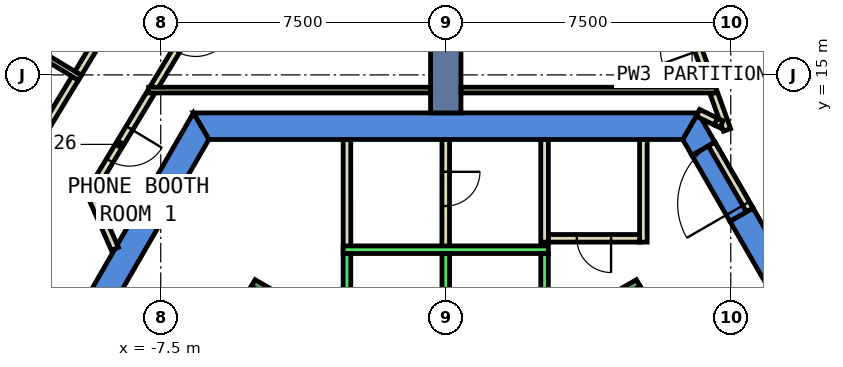
"""IFC4 building model, lengths in metres.
Left out: names, types, materials, properties, quantities, classifications, styles, units other than length and angle.
Written with IfcOpenShell. Run it as: python <this file> out.ifc"""

import sys

from ifc_helpers import new_model, si_unit, direction, frame, frame_2d, origin, place, context, subcontext, project, spatial, polyline, rectangle, outline, extrude, element, fill, save


model = new_model("IFC4")
c1 = context("Model", 3, precision=1e-05, world=origin(), true_north=direction((0.0, 1.0)))
c2 = subcontext(c1, "Body", "Model", "MODEL_VIEW")
j1 = project(units=[si_unit("LENGTHUNIT", "METRE"), si_unit("PLANEANGLEUNIT", "RADIAN")], contexts=[c1])
p1 = place(None, origin())
s1 = spatial("IfcSite", under=j1, at=p1, CompositionType="ELEMENT")
p2 = place(p1, origin())
s2 = spatial("IfcBuilding", under=s1, at=p2, CompositionType="ELEMENT")
p3 = place(p2, frame((0.0, 0.0, 189.8)))
s3 = spatial("IfcBuildingStorey", under=s2, at=p3, CompositionType="ELEMENT", Elevation=189.8)
p4 = place(p3, frame((0.0, 0.0, -0.6)))
e1 = element("IfcWall", 1, at=p4, inside=s3, PredefinedType="SHEAR", context=c2, shape_type="SweptSolid", body=[
    extrude(outline(polyline([(8.084, 11.498), (7.478, 11.148), (12.471, 2.5), (13.279, 2.5), (8.084, 11.498)])), origin(), (0.0, 0.0, 1.0), 4.4),
])
p5 = place(p3, frame((0.0, 0.0, -0.6)))
e2 = element("IfcWall", 2, at=p5, inside=s3, PredefinedType="SHEAR", context=c2, shape_type="SweptSolid", body=[
    extrude(outline(polyline([(6.478, 12.88), (7.084, 13.23), (6.64, 14.0), (6.235, 13.3), (6.478, 12.88)])), origin(), (0.0, 0.0, 1.0), 4.4),
])
p6 = place(p3, frame((0.0, 0.0, 3.6)))
e3 = element("IfcWall", 3, at=p6, inside=s3, PredefinedType="SHEAR", context=c2, shape_type="SweptSolid", body=[
    extrude(outline(polyline([(7.084, 13.23), (6.478, 12.88), (7.478, 11.148), (8.084, 11.498), (7.084, 13.23)])), origin(), (0.0, 0.0, 1.0), 0.2),
])
p7 = place(p3, frame((0.0, 0.0, -0.6)))
e4 = element("IfcWall", 4, at=p7, inside=s3, PredefinedType="SHEAR", context=c2, shape_type="SweptSolid", body=[
    extrude(outline(polyline([(6.64, 14.0), (-6.64, 14.0), (-6.235, 13.3), (6.235, 13.3), (6.64, 14.0)])), origin(), (0.0, 0.0, 1.0), 4.4),
])
p8 = place(p3, frame((0.0, 0.0, -0.6)))
e5 = element("IfcWall", 5, at=p8, inside=s3, PredefinedType="SHEAR", context=c2, shape_type="SweptSolid", body=[
    extrude(outline(polyline([(-11.834, 5.002), (-11.228, 4.652), (-6.235, 13.3), (-6.64, 14.0), (-11.834, 5.002)])), origin(), (0.0, 0.0, 1.0), 4.4),
])
p9 = place(p3, frame((0.0, 14.0, -0.6), z_axis=(0.0, 0.0, 1.0), x_axis=(0.0, 1.0, 0.0)))
e6 = element("IfcWall", 6, at=p9, inside=s3, PredefinedType="SHEAR", context=c2, shape_type="SweptSolid", body=[
    extrude(rectangle(XDim=9.0, YDim=0.8, at=frame_2d((4.5, 0.0))), origin(), (0.0, 0.0, 1.0), 4.4),
])
p10 = place(p3, frame((6.64, 14.0, 0.0), z_axis=(0.0, 0.0, 1.0), x_axis=(0.899046412443, -0.437853341055, 0.0)))
e7 = element("IfcWall", 7, at=p10, inside=s3, PredefinedType="PARTITIONING", context=c2, shape_type="SweptSolid", body=[
    extrude(rectangle(XDim=0.523, YDim=0.2, at=frame_2d((0.261, 0.0))), origin(), (0.0, 0.0, 1.0), 3.8),
])
p11 = place(p3, frame((7.401, 13.552, 0.0), z_axis=(0.0, 0.0, 1.0), x_axis=(-0.337944878606, 0.941165904091, 0.0)))
e8 = element("IfcWall", 8, at=p11, inside=s3, PredefinedType="PARTITIONING", context=c2, shape_type="SweptSolid", body=[
    extrude(rectangle(XDim=1.038, YDim=0.2, at=frame_2d((0.519, 0.0))), origin(), (0.0, 0.0, 1.0), 3.8),
])
p12 = place(p3, frame((-7.759, 14.536, 0.0), z_axis=(0.0, 0.0, 1.0), x_axis=(-0.516926279395, -0.856029918678, 0.0)))
e9 = element("IfcWall", 9, at=p12, inside=s3, PredefinedType="PARTITIONING", context=c2, shape_type="SweptSolid", body=[
    extrude(rectangle(XDim=3.188, YDim=0.2, at=frame_2d((1.594, 0.0))), origin(), (0.0, 0.0, 1.0), 3.8),
])
p13 = place(p12, frame((1.094, 0.0, 0.0)))
e10 = element("IfcOpeningElement", 10, at=p13, cuts=e9, PredefinedType="OPENING", context=c2, shape_type="SweptSolid", body=[
    extrude(rectangle(XDim=1.0, YDim=2.1, at=frame_2d((0.5, 1.05))), frame((0.0, 0.11, 0.0), z_axis=(0.0, -1.0, 0.0), x_axis=(1.0, 0.0, 0.0)), (0.0, 0.0, 1.0), 0.22),
])
p14 = place(p3, frame((-9.315, 11.801, 0.0), z_axis=(0.0, 0.0, 1.0), x_axis=(0.403943240321, -0.914784050254, 0.0)))
e11 = element("IfcWall", 11, at=p14, inside=s3, PredefinedType="PARTITIONING", context=c2, shape_type="SweptSolid", body=[
    extrude(rectangle(XDim=1.507, YDim=0.2, at=frame_2d((0.754, 0.0))), origin(), (0.0, 0.0, 1.0), 3.8),
])
p15 = place(p3, frame((6.999, 14.671, 0.0), z_axis=(0.0, 0.0, 1.0), x_axis=(-0.338795881304, 0.940859899672, 0.0)))
e12 = element("IfcWall", 12, at=p15, inside=s3, PredefinedType="PARTITIONING", context=c2, shape_type="SweptSolid", body=[
    extrude(rectangle(XDim=3.055, YDim=0.2, at=frame_2d((1.527, 0.0))), origin(), (0.0, 0.0, 1.0), 3.8),
])
p16 = place(p15, frame((1.027, 0.0, 0.0)))
e13 = element("IfcOpeningElement", 13, at=p16, cuts=e12, PredefinedType="OPENING", context=c2, shape_type="SweptSolid", body=[
    extrude(rectangle(XDim=1.0, YDim=2.1, at=frame_2d((0.5, 1.05))), frame((0.0, 0.11, 0.0), z_axis=(0.0, -1.0, 0.0), x_axis=(1.0, 0.0, 0.0)), (0.0, 0.0, 1.0), 0.22),
])
p17 = place(p3, frame((-5.998, 17.451, 0.0), z_axis=(0.0, 0.0, 1.0), x_axis=(-0.516919907997, -0.856033766108, 0.0)))
e14 = element("IfcWall", 14, at=p17, inside=s3, PredefinedType="PARTITIONING", context=c2, shape_type="SweptSolid", body=[
    extrude(rectangle(XDim=3.256, YDim=0.2, at=frame_2d((1.628, 0.0))), origin(), (0.0, 0.0, 1.0), 3.8),
])
p18 = place(p17, frame((1.128, 0.0, 0.0)))
e15 = element("IfcOpeningElement", 15, at=p18, cuts=e14, PredefinedType="OPENING", context=c2, shape_type="SweptSolid", body=[
    extrude(rectangle(XDim=1.0, YDim=2.1, at=frame_2d((0.5, 1.05))), frame((0.0, 0.11, 0.0), z_axis=(0.0, -1.0, 0.0), x_axis=(1.0, 0.0, 0.0)), (0.0, 0.0, 1.0), 0.22),
])
p19 = place(p3, frame((7.615, 18.449, 0.0), z_axis=(0.0, 0.0, 1.0), x_axis=(0.516918251554, -0.856034766356, 0.0)))
e16 = element("IfcWall", 16, at=p19, inside=s3, PredefinedType="PARTITIONING", context=c2, shape_type="SweptSolid", body=[
    extrude(rectangle(XDim=3.983, YDim=0.2, at=frame_2d((1.992, 0.0))), origin(), (0.0, 0.0, 1.0), 3.8),
])
p20 = place(p19, frame((1.492, 0.0, 0.0)))
e17 = element("IfcOpeningElement", 17, at=p20, cuts=e16, PredefinedType="OPENING", context=c2, shape_type="SweptSolid", body=[
    extrude(rectangle(XDim=1.0, YDim=2.1, at=frame_2d((0.5, 1.05))), frame((0.0, 0.11, 0.0), z_axis=(0.0, -1.0, 0.0), x_axis=(1.0, 0.0, 0.0)), (0.0, 0.0, 1.0), 0.22),
])
p21 = place(p3, frame((-9.674, 15.039, 0.0), z_axis=(0.0, 0.0, 1.0), x_axis=(0.516918251554, 0.856034766356, 0.0)))
e18 = element("IfcWall", 18, at=p21, inside=s3, PredefinedType="PARTITIONING", context=c2, shape_type="SweptSolid", body=[
    extrude(rectangle(XDim=3.983, YDim=0.2, at=frame_2d((1.992, 0.0))), origin(), (0.0, 0.0, 1.0), 3.8),
])
p22 = place(p3, frame((-11.811, 11.503, 0.0), z_axis=(0.0, 0.0, 1.0), x_axis=(0.517135291957, 0.855903668535, 0.0)))
e19 = element("IfcWall", 19, at=p22, inside=s3, PredefinedType="PARTITIONING", context=c2, shape_type="SweptSolid", body=[
    extrude(rectangle(XDim=3.982, YDim=0.2, at=frame_2d((1.991, 0.0))), origin(), (0.0, 0.0, 1.0), 3.8),
])
p23 = place(p3, frame((5.2, 13.3, 0.0), z_axis=(0.0, 0.0, 1.0), x_axis=(0.0, -1.0, 0.0)))
e20 = element("IfcWall", 20, at=p23, inside=s3, PredefinedType="PARTITIONING", context=c2, shape_type="SweptSolid", body=[
    extrude(rectangle(XDim=2.7, YDim=0.2, at=frame_2d((1.35, 0.0))), origin(), (0.0, 0.0, 1.0), 3.8),
])
p24 = place(p3, frame((5.1, 10.7, 0.0), z_axis=(0.0, 0.0, 1.0), x_axis=(-1.0, 0.0, 0.0)))
e21 = element("IfcWall", 21, at=p24, inside=s3, PredefinedType="PARTITIONING", context=c2, shape_type="SweptSolid", body=[
    extrude(rectangle(XDim=2.4, YDim=0.2, at=frame_2d((1.2, 0.0))), origin(), (0.0, 0.0, 1.0), 3.8),
])
p25 = place(p24, frame((0.75, 0.0, 0.0)))
e22 = element("IfcOpeningElement", 22, at=p25, cuts=e21, PredefinedType="OPENING", context=c2, shape_type="SweptSolid", body=[
    extrude(rectangle(XDim=0.9, YDim=2.1, at=frame_2d((0.45, 1.05))), frame((0.0, 0.11, 0.0), z_axis=(0.0, -1.0, 0.0), x_axis=(1.0, 0.0, 0.0)), (0.0, 0.0, 1.0), 0.22),
])
p26 = place(p3, frame((2.6, 10.6, 0.0), z_axis=(0.0, 0.0, 1.0), x_axis=(0.0, 1.0, 0.0)))
e23 = element("IfcWall", 23, at=p26, inside=s3, PredefinedType="PARTITIONING", context=c2, shape_type="SweptSolid", body=[
    extrude(rectangle(XDim=2.7, YDim=0.2, at=frame_2d((1.35, 0.0))), origin(), (0.0, 0.0, 1.0), 3.8),
])
p27 = place(p3, frame((-2.599, 10.399, 0.0), z_axis=(0.0, 0.0, 1.0), x_axis=(-0.000336615314, 0.999999943345, 0.0)))
e24 = element("IfcWall", 24, at=p27, inside=s3, PredefinedType="PARTITIONING", context=c2, shape_type="SweptSolid", body=[
    extrude(rectangle(XDim=2.901, YDim=0.2, at=frame_2d((1.451, 0.0))), origin(), (0.0, 0.0, 1.0), 3.8),
])
p28 = place(p3, frame((0.0, 13.3, 0.0), z_axis=(0.0, 0.0, 1.0), x_axis=(-0.000336728662, -0.999999943307, 0.0)))
e25 = element("IfcWall", 25, at=p28, inside=s3, PredefinedType="PARTITIONING", context=c2, shape_type="SweptSolid", body=[
    extrude(rectangle(XDim=2.9, YDim=0.2, at=frame_2d((1.45, 0.0))), origin(), (0.0, 0.0, 1.0), 3.8),
])
p29 = place(p28, frame((0.85, 0.0, 0.0)))
e26 = element("IfcOpeningElement", 26, at=p29, cuts=e25, PredefinedType="OPENING", context=c2, shape_type="SweptSolid", body=[
    extrude(rectangle(XDim=0.9, YDim=2.1, at=frame_2d((0.45, 1.05))), frame((0.0, 0.11, 0.0), z_axis=(0.0, -1.0, 0.0), x_axis=(1.0, 0.0, 0.0)), (0.0, 0.0, 1.0), 0.22),
])
p30 = place(p3, frame((7.124, 14.6, 0.0), z_axis=(0.0, 0.0, 1.0), x_axis=(-1.0, 0.0, 0.0)))
e27 = element("IfcWall", 27, at=p30, inside=s3, PredefinedType="PARTITIONING", context=c2, shape_type="SweptSolid", body=[
    extrude(rectangle(XDim=6.724, YDim=0.15, at=frame_2d((3.362, 0.0))), origin(), (0.0, 0.0, 1.0), 3.8),
])
p31 = place(p3, frame((-0.4, 14.6, 0.0), z_axis=(0.0, 0.0, 1.0), x_axis=(-1.0, 0.0, 0.0)))
e28 = element("IfcWall", 28, at=p31, inside=s3, PredefinedType="PARTITIONING", context=c2, shape_type="SweptSolid", body=[
    extrude(rectangle(XDim=7.42, YDim=0.15, at=frame_2d((3.71, 0.0))), origin(), (0.0, 0.0, 1.0), 3.8),
])
p32 = place(p3, frame((-9.628, 14.924, 0.0), z_axis=(0.0, 0.0, 1.0), x_axis=(-0.855931736607, 0.517088834021, 0.0)))
e29 = element("IfcWall", 29, at=p32, inside=s3, PredefinedType="PARTITIONING", context=c2, shape_type="SweptSolid", body=[
    extrude(rectangle(XDim=5.699, YDim=0.15, at=frame_2d((2.85, 0.0))), origin(), (0.0, 0.0, 1.0), 3.8),
])
p33 = place(p3, frame((7.997, 11.448, 0.0), z_axis=(0.0, 0.0, 1.0), x_axis=(-0.50002537861, 0.866010750942, 0.0)))
e30 = element("IfcWall", 30, at=p33, inside=s3, PredefinedType="PARTITIONING", context=c2, shape_type="SweptSolid", body=[
    extrude(rectangle(XDim=2.0, YDim=0.2, at=frame_2d((1.0, 0.0))), origin(), (0.0, 0.0, 1.0), 2.4),
])
p34 = place(p33, frame((0.19, 0.0, 0.0)))
e31 = element("IfcOpeningElement", 31, at=p34, cuts=e30, PredefinedType="OPENING", context=c2, shape_type="SweptSolid", body=[
    extrude(rectangle(XDim=1.8, YDim=2.1, at=frame_2d((0.9, 1.05))), frame((0.0, 0.11, 0.0), z_axis=(0.0, -1.0, 0.0), x_axis=(1.0, 0.0, 0.0)), (0.0, 0.0, 1.0), 0.22),
])
p35 = place(p3, frame((7.11, 13.771, 0.0), z_axis=(0.0, 0.0, 1.0), x_axis=(0.900120852209, -0.435640277545, 0.0)))
e32 = element("IfcWall", 32, at=p35, inside=s3, PredefinedType="PARTITIONING", context=c2, shape_type="SweptSolid", body=[
    extrude(rectangle(XDim=0.161, YDim=0.2, at=frame_2d((0.081, 0.0))), origin(), (0.0, 0.0, 1.0), 2.4),
])
p36 = place(p3, frame((2.7, 10.4, 0.0), z_axis=(0.0, 0.0, 1.0), x_axis=(-1.0, 0.0, 0.0)))
e33 = element("IfcWall", 33, at=p36, inside=s3, PredefinedType="STANDARD", context=c2, shape_type="SweptSolid", body=[
    extrude(rectangle(XDim=5.4, YDim=0.2, at=frame_2d((2.7, 0.0))), origin(), (0.0, 0.0, 1.0), 3.8),
])
for number, where, z_axis, x_axis in (
    (34, (2.6, 7.9, 0.0), (0.0, 0.0, 1.0), (0.0, 1.0, 0.0)),
    (35, (0.0, 7.9, 0.0), (0.0, 0.0, 1.0), (0.0, 1.0, 0.0)),
    (36, (-2.6, 7.9, 0.0), (0.0, 0.0, 1.0), (0.0, 1.0, 0.0)),
):
    element("IfcWall", number, at=place(p3, frame(where, z_axis=z_axis, x_axis=x_axis)), inside=s3, PredefinedType="STANDARD", context=c2, shape_type="SweptSolid", body=[
        extrude(rectangle(XDim=2.4, YDim=0.2, at=frame_2d((1.2, 0.0))), origin(), (0.0, 0.0, 1.0), 3.8),
    ])
p37 = place(p3, frame((2.7, 8.158, 0.0), z_axis=(0.0, 0.0, 1.0), x_axis=(0.86611865017, 0.499838457731, 0.0)))
e37 = element("IfcWall", 37, at=p37, inside=s3, PredefinedType="STANDARD", context=c2, shape_type="SweptSolid", body=[
    extrude(rectangle(XDim=2.733, YDim=0.2, at=frame_2d((1.366, 0.0))), origin(), (0.0, 0.0, 1.0), 3.8),
])
p38 = place(p3, frame((8.48, 3.412, 0.0), z_axis=(0.0, 0.0, 1.0), x_axis=(-0.499978703459, 0.866037698999, 0.0)))
e38 = element("IfcWall", 38, at=p38, inside=s3, PredefinedType="STANDARD", context=c2, shape_type="SweptSolid", body=[
    extrude(rectangle(XDim=6.9, YDim=0.2, at=frame_2d((3.45, 0.0))), origin(), (0.0, 0.0, 1.0), 3.8),
])
p39 = place(p3, frame((-1.256, 7.324, 0.0), z_axis=(0.0, 0.0, 1.0), x_axis=(-0.866046073146, 0.499964197906, 0.0)))
e39 = element("IfcWall", 39, at=p39, inside=s3, PredefinedType="STANDARD", context=c2, shape_type="SweptSolid", body=[
    extrude(rectangle(XDim=4.4, YDim=0.2, at=frame_2d((2.2, 0.0))), origin(), (0.0, 0.0, 1.0), 3.8),
])
p40 = place(p39, frame((2.4, 0.0, 0.0)))
e40 = element("IfcOpeningElement", 40, at=p40, cuts=e39, PredefinedType="OPENING", context=c2, shape_type="SweptSolid", body=[
    extrude(rectangle(XDim=1.1, YDim=2.2, at=frame_2d((0.55, 1.1))), frame((0.0, 0.11, 0.0), z_axis=(0.0, -1.0, 0.0), x_axis=(1.0, 0.0, 0.0)), (0.0, 0.0, 1.0), 0.22),
])
p41 = place(p3, frame((-5.03, 9.388, 0.0), z_axis=(0.0, 0.0, 1.0), x_axis=(-0.499978703459, -0.866037698999, 0.0)))
e41 = element("IfcWall", 41, at=p41, inside=s3, PredefinedType="STANDARD", context=c2, shape_type="SweptSolid", body=[
    extrude(rectangle(XDim=6.9, YDim=0.2, at=frame_2d((3.45, 0.0))), origin(), (0.0, 0.0, 1.0), 3.8),
])
p42 = place(p13, origin())
e42 = element("IfcDoor", 42, at=p42, inside=s3, OperationType="SINGLE_SWING_LEFT", PredefinedType="DOOR", context=c2, shape_type="SweptSolid", body=[
    extrude(rectangle(XDim=1.0, YDim=2.1, at=frame_2d((0.5, 1.05))), frame((0.0, 0.025, 0.0), z_axis=(0.0, -1.0, 0.0), x_axis=(1.0, 0.0, 0.0)), (0.0, 0.0, 1.0), 0.05),
])
fill(e10, e42)
p43 = place(p25, origin())
e43 = element("IfcDoor", 43, at=p43, inside=s3, OperationType="SINGLE_SWING_RIGHT", PredefinedType="DOOR", context=c2, shape_type="SweptSolid", body=[
    extrude(rectangle(XDim=0.9, YDim=2.1, at=frame_2d((0.45, 1.05))), frame((0.0, 0.025, 0.0), z_axis=(0.0, -1.0, 0.0), x_axis=(1.0, 0.0, 0.0)), (0.0, 0.0, 1.0), 0.05),
])
fill(e22, e43)
p44 = place(p29, origin())
e44 = element("IfcDoor", 44, at=p44, inside=s3, OperationType="SINGLE_SWING_RIGHT", PredefinedType="DOOR", context=c2, shape_type="SweptSolid", body=[
    extrude(rectangle(XDim=0.9, YDim=2.1, at=frame_2d((0.45, 1.05))), frame((0.0, 0.025, 0.0), z_axis=(0.0, -1.0, 0.0), x_axis=(1.0, 0.0, 0.0)), (0.0, 0.0, 1.0), 0.05),
])
fill(e26, e44)
p45 = place(p34, origin())
e45 = element("IfcDoor", 45, at=p45, inside=s3, OperationType="DOUBLE_DOOR_SINGLE_SWING", PredefinedType="DOOR", context=c2, shape_type="SweptSolid", body=[
    extrude(rectangle(XDim=1.8, YDim=2.1, at=frame_2d((0.9, 1.05))), frame((0.0, 0.025, 0.0), z_axis=(0.0, -1.0, 0.0), x_axis=(1.0, 0.0, 0.0)), (0.0, 0.0, 1.0), 0.05),
])
fill(e31, e45)
save(model, sys.argv[1])
